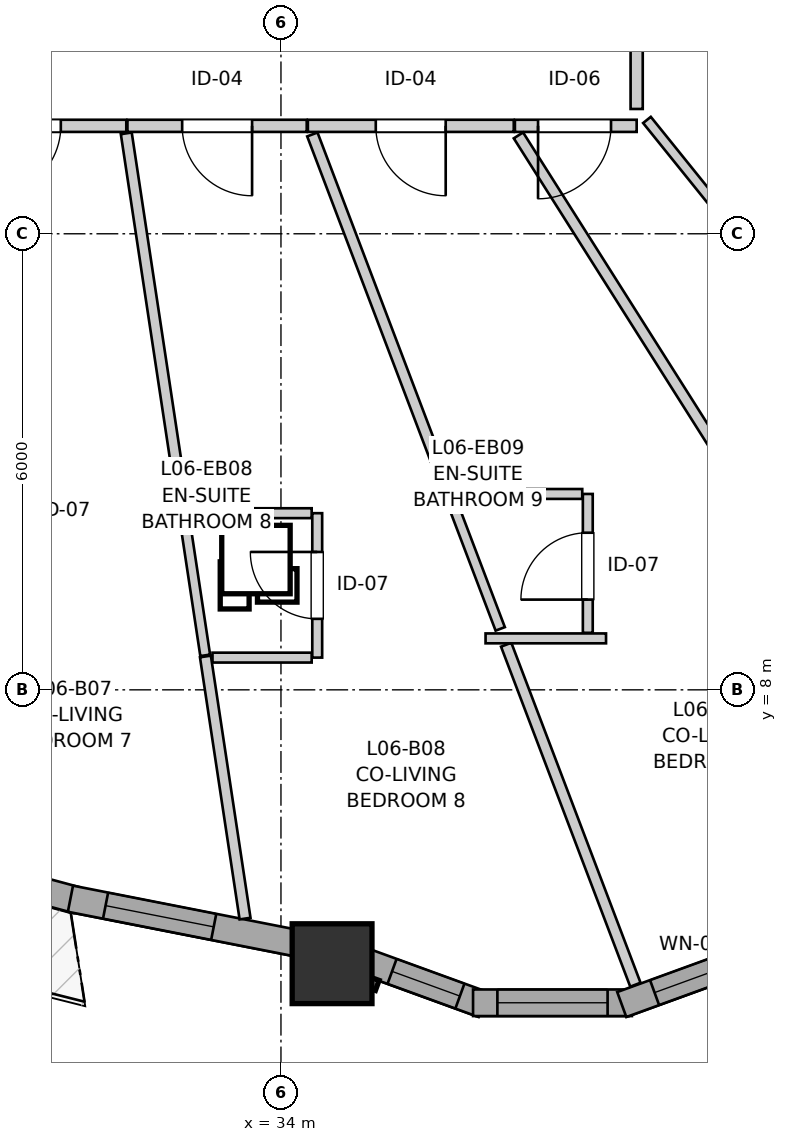
"""IFC4 building model, lengths in metres.
Left out: names, types, materials, properties, quantities, classifications, styles, units other than length and angle.
Written with IfcOpenShell. Run it as: python <this file> out.ifc"""

import sys

from ifc_helpers import new_model, si_unit, direction, frame, frame_2d, origin, origin_2d, place, context, subcontext, project, spatial, rectangle, extrude, source, transform, mapped, element, fill, save


model = new_model("IFC4")
c1 = context("Model", 3, precision=1e-05, world=origin(), true_north=direction((0.0, 1.0)))
c2 = subcontext(c1, "Body", "Model", "MODEL_VIEW")
j1 = project(units=[si_unit("LENGTHUNIT", "METRE"), si_unit("PLANEANGLEUNIT", "RADIAN")], contexts=[c1])
p1 = place(None, origin())
s1 = spatial("IfcSite", under=j1, at=p1, CompositionType="ELEMENT")
p2 = place(p1, origin())
s2 = spatial("IfcBuilding", under=s1, at=p2, CompositionType="ELEMENT")
p3 = place(p2, frame((0.0, 0.0, 23.8)))
s3 = spatial("IfcBuildingStorey", under=s2, at=p3, CompositionType="ELEMENT", Elevation=23.8)
m1 = source(origin(), c2, "Body", "SweptSolid", [
    extrude(rectangle(XDim=1.05, YDim=1.05, at=origin_2d()), origin(), (0.0, 0.0, 1.0), 2.935),
])
p4 = place(p3, frame((34.673, 4.397, 0.0), z_axis=(0.0, 0.0, 1.0), x_axis=(1.0, 0.0, 0.0)))
e1 = element("IfcColumn", 1, at=p4, inside=s3, PredefinedType="COLUMN", context=c2, shape_type="MappedRepresentation", body=[
    mapped(m1, transform((0.0, 0.0, 0.0), x_axis=(1.0, 0.0, 0.0), y_axis=(0.0, 1.0, 0.0), z_axis=(0.0, 0.0, 1.0), scale=1.0)),
])
p5 = place(p3, frame((27.986, 6.131, 0.0), z_axis=(0.0, 0.0, 1.0), x_axis=(0.96546113776, -0.2605471003, 0.0)))
e2 = element("IfcWall", 2, at=p5, inside=s3, PredefinedType="SOLIDWALL", context=c2, shape_type="SweptSolid", body=[
    extrude(rectangle(XDim=3.449, YDim=0.35, at=frame_2d((1.725, 0.0))), origin(), (0.0, 0.0, 1.0), 2.415),
])
p6 = place(p5, frame((1.179, 0.0, 0.82)))
e3 = element("IfcOpeningElement", 3, at=p6, cuts=e2, PredefinedType="OPENING", context=c2, shape_type="SweptSolid", body=[
    extrude(rectangle(XDim=1.45, YDim=1.25, at=frame_2d((0.725, 0.625))), frame((0.0, 0.185, 0.0), z_axis=(0.0, -1.0, 0.0), x_axis=(1.0, 0.0, 0.0)), (0.0, 0.0, 1.0), 0.37),
])
p7 = place(p3, frame((31.23, 5.252, 0.0), z_axis=(0.0, 0.0, 1.0), x_axis=(0.981232542219, -0.192828156892, 0.0)))
e4 = element("IfcWall", 4, at=p7, inside=s3, PredefinedType="SOLIDWALL", context=c2, shape_type="SweptSolid", body=[
    extrude(rectangle(XDim=3.242, YDim=0.35, at=frame_2d((1.621, 0.0))), origin(), (0.0, 0.0, 1.0), 2.415),
])
p8 = place(p7, frame((0.471, 0.0, 0.82)))
e5 = element("IfcOpeningElement", 5, at=p8, cuts=e4, PredefinedType="OPENING", context=c2, shape_type="SweptSolid", body=[
    extrude(rectangle(XDim=1.45, YDim=1.25, at=frame_2d((0.725, 0.625))), frame((0.0, 0.185, 0.0), z_axis=(0.0, -1.0, 0.0), x_axis=(1.0, 0.0, 0.0)), (0.0, 0.0, 1.0), 0.37),
])
p9 = place(p3, frame((35.014, 4.459, 0.0), z_axis=(0.0, 0.0, 1.0), x_axis=(0.939720171257, -0.341944439541, 0.0)))
e6 = element("IfcWall", 6, at=p9, inside=s3, PredefinedType="SOLIDWALL", context=c2, shape_type="SweptSolid", body=[
    extrude(rectangle(XDim=1.752, YDim=0.35, at=frame_2d((0.876, 0.0))), origin(), (0.0, 0.0, 1.0), 2.415),
])
p10 = place(p9, frame((0.476, 0.0, 0.82)))
e7 = element("IfcOpeningElement", 7, at=p10, cuts=e6, PredefinedType="OPENING", context=c2, shape_type="SweptSolid", body=[
    extrude(rectangle(XDim=0.95, YDim=1.35, at=frame_2d((0.475, 0.675))), frame((0.0, 0.185, 0.0), z_axis=(0.0, -1.0, 0.0), x_axis=(1.0, 0.0, 0.0)), (0.0, 0.0, 1.0), 0.37),
])
p11 = place(p3, frame((36.527, 3.883, 0.0), z_axis=(0.0, 0.0, 1.0), x_axis=(1.0, 0.0, 0.0)))
e8 = element("IfcWall", 8, at=p11, inside=s3, PredefinedType="SOLIDWALL", context=c2, shape_type="SweptSolid", body=[
    extrude(rectangle(XDim=2.09, YDim=0.35, at=frame_2d((1.045, 0.0))), origin(), (0.0, 0.0, 1.0), 2.415),
])
p12 = place(p11, frame((0.32, 0.0, 0.82)))
e9 = element("IfcOpeningElement", 9, at=p12, cuts=e8, PredefinedType="OPENING", context=c2, shape_type="SweptSolid", body=[
    extrude(rectangle(XDim=1.45, YDim=1.25, at=frame_2d((0.725, 0.625))), frame((0.0, 0.185, 0.0), z_axis=(0.0, -1.0, 0.0), x_axis=(1.0, 0.0, 0.0)), (0.0, 0.0, 1.0), 0.37),
])
p13 = place(p3, frame((38.484, 3.86, 0.0), z_axis=(0.0, 0.0, 1.0), x_axis=(0.939711556618, 0.341968113072, 0.0)))
e10 = element("IfcWall", 10, at=p13, inside=s3, PredefinedType="SOLIDWALL", context=c2, shape_type="SweptSolid", body=[
    extrude(rectangle(XDim=2.09, YDim=0.35, at=frame_2d((1.045, 0.0))), origin(), (0.0, 0.0, 1.0), 2.415),
])
p14 = place(p13, frame((0.459, 0.0, 0.82)))
e11 = element("IfcOpeningElement", 11, at=p14, cuts=e10, PredefinedType="OPENING", context=c2, shape_type="SweptSolid", body=[
    extrude(rectangle(XDim=1.35, YDim=1.45, at=frame_2d((0.675, 0.725))), frame((0.0, 0.185, 0.0), z_axis=(0.0, -1.0, 0.0), x_axis=(1.0, 0.0, 0.0)), (0.0, 0.0, 1.0), 0.37),
])
p15 = place(p3, frame((37.063, 15.42, 0.0), z_axis=(0.0, 0.0, 1.0), x_axis=(-1.0, 0.0, 0.0)))
e12 = element("IfcWall", 12, at=p15, inside=s3, PredefinedType="PARTITIONING", context=c2, shape_type="SweptSolid", body=[
    extrude(rectangle(XDim=2.709, YDim=0.16, at=frame_2d((1.354, 0.0))), origin(), (0.0, 0.0, 1.0), 2.935),
])
p16 = place(p15, frame((0.896, 0.0, 0.0)))
e13 = element("IfcOpeningElement", 13, at=p16, cuts=e12, PredefinedType="OPENING", context=c2, shape_type="SweptSolid", body=[
    extrude(rectangle(XDim=0.92, YDim=2.1, at=frame_2d((0.46, 1.05))), frame((0.0, 0.09, 0.0), z_axis=(0.0, -1.0, 0.0), x_axis=(1.0, 0.0, 0.0)), (0.0, 0.0, 1.0), 0.18),
])
p17 = place(p3, frame((31.965, 15.42, 0.0), z_axis=(0.0, 0.0, 1.0), x_axis=(-1.0, 0.0, 0.0)))
e14 = element("IfcWall", 14, at=p17, inside=s3, PredefinedType="PARTITIONING", context=c2, shape_type="SweptSolid", body=[
    extrude(rectangle(XDim=2.598, YDim=0.16, at=frame_2d((1.299, 0.0))), origin(), (0.0, 0.0, 1.0), 2.935),
])
p18 = place(p17, frame((0.862, 0.0, 0.0)))
e15 = element("IfcOpeningElement", 15, at=p18, cuts=e14, PredefinedType="OPENING", context=c2, shape_type="SweptSolid", body=[
    extrude(rectangle(XDim=0.92, YDim=2.1, at=frame_2d((0.46, 1.05))), frame((0.0, 0.09, 0.0), z_axis=(0.0, -1.0, 0.0), x_axis=(1.0, 0.0, 0.0)), (0.0, 0.0, 1.0), 0.18),
])
p19 = place(p3, frame((38.68, 18.147, 0.0), z_axis=(0.0, 0.0, 1.0), x_axis=(0.0, -1.0, 0.0)))
e16 = element("IfcWall", 16, at=p19, inside=s3, PredefinedType="PARTITIONING", context=c2, shape_type="SweptSolid", body=[
    extrude(rectangle(XDim=2.505, YDim=0.16, at=frame_2d((1.252, 0.0))), origin(), (0.0, 0.0, 1.0), 2.935),
])
p20 = place(p19, frame((0.748, 0.0, 0.0)))
e17 = element("IfcOpeningElement", 17, at=p20, cuts=e16, PredefinedType="OPENING", context=c2, shape_type="SweptSolid", body=[
    extrude(rectangle(XDim=0.95, YDim=2.1, at=frame_2d((0.475, 1.05))), frame((0.0, 0.09, 0.0), z_axis=(0.0, -1.0, 0.0), x_axis=(1.0, 0.0, 0.0)), (0.0, 0.0, 1.0), 0.18),
])
p21 = place(p3, frame((34.339, 15.42, 0.0), z_axis=(0.0, 0.0, 1.0), x_axis=(-1.0, 0.0, 0.0)))
e18 = element("IfcWall", 18, at=p21, inside=s3, PredefinedType="PARTITIONING", context=c2, shape_type="SweptSolid", body=[
    extrude(rectangle(XDim=2.359, YDim=0.16, at=frame_2d((1.18, 0.0))), origin(), (0.0, 0.0, 1.0), 2.935),
])
p22 = place(p21, frame((0.719, 0.0, 0.0)))
e19 = element("IfcOpeningElement", 19, at=p22, cuts=e18, PredefinedType="OPENING", context=c2, shape_type="SweptSolid", body=[
    extrude(rectangle(XDim=0.92, YDim=2.1, at=frame_2d((0.46, 1.05))), frame((0.0, 0.09, 0.0), z_axis=(0.0, -1.0, 0.0), x_axis=(1.0, 0.0, 0.0)), (0.0, 0.0, 1.0), 0.18),
])
p23 = place(p3, frame((34.477, 8.424, 0.0), z_axis=(0.0, 0.0, 1.0), x_axis=(0.0, 1.0, 0.0)))
e20 = element("IfcWall", 20, at=p23, inside=s3, PredefinedType="PARTITIONING", context=c2, shape_type="SweptSolid", body=[
    extrude(rectangle(XDim=1.9, YDim=0.13, at=frame_2d((0.95, 0.0))), origin(), (0.0, 0.0, 1.0), 2.935),
])
p24 = place(p23, frame((0.51, 0.0, 0.0)))
e21 = element("IfcOpeningElement", 21, at=p24, cuts=e20, PredefinedType="OPENING", context=c2, shape_type="SweptSolid", body=[
    extrude(rectangle(XDim=0.88, YDim=2.05, at=frame_2d((0.44, 1.025))), frame((0.0, 0.075, 0.0), z_axis=(0.0, -1.0, 0.0), x_axis=(1.0, 0.0, 0.0)), (0.0, 0.0, 1.0), 0.15),
])
p25 = place(p3, frame((38.037, 8.75, 0.0), z_axis=(0.0, 0.0, 1.0), x_axis=(0.0, 1.0, 0.0)))
e22 = element("IfcWall", 22, at=p25, inside=s3, PredefinedType="PARTITIONING", context=c2, shape_type="SweptSolid", body=[
    extrude(rectangle(XDim=1.827, YDim=0.13, at=frame_2d((0.914, 0.0))), origin(), (0.0, 0.0, 1.0), 2.935),
])
p26 = place(p25, frame((0.437, 0.0, 0.0)))
e23 = element("IfcOpeningElement", 23, at=p26, cuts=e22, PredefinedType="OPENING", context=c2, shape_type="SweptSolid", body=[
    extrude(rectangle(XDim=0.88, YDim=2.05, at=frame_2d((0.44, 1.025))), frame((0.0, 0.075, 0.0), z_axis=(0.0, -1.0, 0.0), x_axis=(1.0, 0.0, 0.0)), (0.0, 0.0, 1.0), 0.15),
])
p27 = place(p3, frame((38.68, 15.42, 0.0), z_axis=(0.0, 0.0, 1.0), x_axis=(-1.0, 0.0, 0.0)))
e24 = element("IfcWall", 24, at=p27, inside=s3, PredefinedType="PARTITIONING", context=c2, shape_type="SweptSolid", body=[
    extrude(rectangle(XDim=1.602, YDim=0.16, at=frame_2d((0.801, 0.0))), origin(), (0.0, 0.0, 1.0), 2.935),
])
p28 = place(p27, frame((0.337, 0.0, 0.0)))
e25 = element("IfcOpeningElement", 25, at=p28, cuts=e24, PredefinedType="OPENING", context=c2, shape_type="SweptSolid", body=[
    extrude(rectangle(XDim=0.96, YDim=2.1, at=frame_2d((0.48, 1.05))), frame((0.0, 0.09, 0.0), z_axis=(0.0, -1.0, 0.0), x_axis=(1.0, 0.0, 0.0)), (0.0, 0.0, 1.0), 0.18),
])
p29 = place(p3, frame((37.125, 15.294, 0.0), z_axis=(0.0, 0.0, 1.0), x_axis=(0.534743765269, -0.845014263492, 0.0)))
e26 = element("IfcWall", 26, at=p29, inside=s3, PredefinedType="PARTITIONING", context=c2, shape_type="SweptSolid", body=[
    extrude(rectangle(XDim=9.797, YDim=0.145, at=frame_2d((4.899, 0.0))), origin(), (0.0, 0.0, 1.0), 2.935),
])
p30 = place(p3, frame((38.81, 18.061, 0.0), z_axis=(0.0, 0.0, 1.0), x_axis=(0.729196389153, -0.684304483433, 0.0)))
e27 = element("IfcWall", 27, at=p30, inside=s3, PredefinedType="PARTITIONING", context=c2, shape_type="SweptSolid", body=[
    extrude(rectangle(XDim=7.396, YDim=0.13, at=frame_2d((3.698, 0.0))), origin(), (0.0, 0.0, 1.0), 2.935),
])
p31 = place(p3, frame((38.816, 15.498, 0.0), z_axis=(0.0, 0.0, 1.0), x_axis=(0.627528755525, -0.778593386171, 0.0)))
e28 = element("IfcWall", 28, at=p31, inside=s3, PredefinedType="PARTITIONING", context=c2, shape_type="SweptSolid", body=[
    extrude(rectangle(XDim=6.998, YDim=0.13, at=frame_2d((3.499, 0.0))), origin(), (0.0, 0.0, 1.0), 2.935),
])
p32 = place(p3, frame((34.413, 15.307, 0.0), z_axis=(0.0, 0.0, 1.0), x_axis=(0.355171610573, -0.934801116304, 0.0)))
e29 = element("IfcWall", 29, at=p32, inside=s3, PredefinedType="PARTITIONING", context=c2, shape_type="SweptSolid", body=[
    extrude(rectangle(XDim=5.177, YDim=0.145, at=frame_2d((2.589, 0.0))), origin(), (0.0, 0.0, 1.0), 2.935),
])
p33 = place(p3, frame((31.965, 15.321, 0.0), z_axis=(0.0, 0.0, 1.0), x_axis=(0.149541437001, -0.988755459464, 0.0)))
e30 = element("IfcWall", 30, at=p33, inside=s3, PredefinedType="PARTITIONING", context=c2, shape_type="SweptSolid", body=[
    extrude(rectangle(XDim=5.069, YDim=0.145, at=frame_2d((2.535, 0.0))), origin(), (0.0, 0.0, 1.0), 2.935),
])
p34 = place(p3, frame((36.963, 8.594, 0.0), z_axis=(0.0, 0.0, 1.0), x_axis=(0.35524629266, -0.934772737916, 0.0)))
e31 = element("IfcWall", 31, at=p34, inside=s3, PredefinedType="PARTITIONING", context=c2, shape_type="SweptSolid", body=[
    extrude(rectangle(XDim=4.785, YDim=0.145, at=frame_2d((2.393, 0.0))), origin(), (0.0, 0.0, 1.0), 2.935),
])
p35 = place(p3, frame((33.006, 8.439, 0.0), z_axis=(0.0, 0.0, 1.0), x_axis=(0.149510938207, -0.988760071684, 0.0)))
e32 = element("IfcWall", 32, at=p35, inside=s3, PredefinedType="PARTITIONING", context=c2, shape_type="SweptSolid", body=[
    extrude(rectangle(XDim=3.488, YDim=0.145, at=frame_2d((1.744, 0.0))), origin(), (0.0, 0.0, 1.0), 2.935),
])
p36 = place(p3, frame((36.257, 10.453, 0.0), z_axis=(0.0, 0.0, 1.0), x_axis=(0.355345777079, -0.934734924303, 0.0)))
e33 = element("IfcWall", 33, at=p36, inside=s3, PredefinedType="PARTITIONING", context=c2, shape_type="SweptSolid", body=[
    extrude(rectangle(XDim=1.766, YDim=0.13, at=frame_2d((0.883, 0.0))), origin(), (0.0, 0.0, 1.0), 2.935),
])
p37 = place(p3, frame((32.725, 10.294, 0.0), z_axis=(0.0, 0.0, 1.0), x_axis=(0.149533379282, -0.988756678096, 0.0)))
e34 = element("IfcWall", 34, at=p37, inside=s3, PredefinedType="PARTITIONING", context=c2, shape_type="SweptSolid", body=[
    extrude(rectangle(XDim=1.861, YDim=0.13, at=frame_2d((0.931, 0.0))), origin(), (0.0, 0.0, 1.0), 2.935),
])
p38 = place(p3, frame((36.347, 10.577, 0.0), z_axis=(0.0, 0.0, 1.0), x_axis=(1.0, 0.0, 0.0)))
e35 = element("IfcWall", 35, at=p38, inside=s3, PredefinedType="PARTITIONING", context=c2, shape_type="SweptSolid", body=[
    extrude(rectangle(XDim=1.617, YDim=0.13, at=frame_2d((0.808, 0.0))), origin(), (0.0, 0.0, 1.0), 2.935),
])
p39 = place(p3, frame((32.812, 10.324, 0.0), z_axis=(0.0, 0.0, 1.0), x_axis=(1.0, 0.0, 0.0)))
e36 = element("IfcWall", 36, at=p39, inside=s3, PredefinedType="PARTITIONING", context=c2, shape_type="SweptSolid", body=[
    extrude(rectangle(XDim=1.592, YDim=0.13, at=frame_2d((0.796, 0.0))), origin(), (0.0, 0.0, 1.0), 2.935),
])
p40 = place(p3, frame((33.099, 8.424, 0.0), z_axis=(0.0, 0.0, 1.0), x_axis=(1.0, 0.0, 0.0)))
e37 = element("IfcWall", 37, at=p40, inside=s3, PredefinedType="PARTITIONING", context=c2, shape_type="SweptSolid", body=[
    extrude(rectangle(XDim=1.305, YDim=0.13, at=frame_2d((0.652, 0.0))), origin(), (0.0, 0.0, 1.0), 2.503),
])
p41 = place(p3, frame((36.692, 8.677, 0.0), z_axis=(0.0, 0.0, 1.0), x_axis=(1.0, 0.0, 0.0)))
e38 = element("IfcWall", 38, at=p41, inside=s3, PredefinedType="PARTITIONING", context=c2, shape_type="SweptSolid", body=[
    extrude(rectangle(XDim=1.585, YDim=0.13, at=frame_2d((0.792, 0.0))), origin(), (0.0, 0.0, 1.0), 2.935),
])
m2 = source(origin(), c2, "Body", "SweptSolid", [
    extrude(rectangle(XDim=1.45, YDim=1.25, at=frame_2d((0.725, 0.625))), frame((0.0, 0.03, 0.0), z_axis=(0.0, -1.0, 0.0), x_axis=(1.0, 0.0, 0.0)), (0.0, 0.0, 1.0), 0.06),
])
p42 = place(p8, origin())
e39 = element("IfcWindow", 39, at=p42, inside=s3, PartitioningType="SINGLE_PANEL", PredefinedType="WINDOW", context=c2, shape_type="MappedRepresentation", body=[
    mapped(m2, transform((0.0, 0.0, 0.0), x_axis=(1.0, 0.0, 0.0), y_axis=(0.0, 1.0, 0.0), z_axis=(0.0, 0.0, 1.0), scale=1.0)),
])
fill(e5, e39)
m3 = source(origin(), c2, "Body", "SweptSolid", [
    extrude(rectangle(XDim=0.95, YDim=1.35, at=frame_2d((0.475, 0.675))), frame((0.0, 0.03, 0.0), z_axis=(0.0, -1.0, 0.0), x_axis=(1.0, 0.0, 0.0)), (0.0, 0.0, 1.0), 0.06),
])
p43 = place(p10, origin())
e40 = element("IfcWindow", 40, at=p43, inside=s3, PartitioningType="SINGLE_PANEL", PredefinedType="WINDOW", context=c2, shape_type="MappedRepresentation", body=[
    mapped(m3, transform((0.0, 0.0, 0.0), x_axis=(1.0, 0.0, 0.0), y_axis=(0.0, 1.0, 0.0), z_axis=(0.0, 0.0, 1.0), scale=1.0)),
])
fill(e7, e40)
p44 = place(p12, origin())
e41 = element("IfcWindow", 41, at=p44, inside=s3, PartitioningType="SINGLE_PANEL", PredefinedType="WINDOW", context=c2, shape_type="MappedRepresentation", body=[
    mapped(m2, transform((0.0, 0.0, 0.0), x_axis=(1.0, 0.0, 0.0), y_axis=(0.0, 1.0, 0.0), z_axis=(0.0, 0.0, 1.0), scale=1.0)),
])
fill(e9, e41)
m4 = source(origin(), c2, "Body", "SweptSolid", [
    extrude(rectangle(XDim=1.35, YDim=1.45, at=frame_2d((0.675, 0.725))), frame((0.0, 0.03, 0.0), z_axis=(0.0, -1.0, 0.0), x_axis=(1.0, 0.0, 0.0)), (0.0, 0.0, 1.0), 0.06),
])
p45 = place(p14, origin())
e42 = element("IfcWindow", 42, at=p45, inside=s3, PartitioningType="SINGLE_PANEL", PredefinedType="WINDOW", context=c2, shape_type="MappedRepresentation", body=[
    mapped(m4, transform((0.0, 0.0, 0.0), x_axis=(1.0, 0.0, 0.0), y_axis=(0.0, 1.0, 0.0), z_axis=(0.0, 0.0, 1.0), scale=1.0)),
])
fill(e11, e42)
m5 = source(origin(), c2, "Body", "SweptSolid", [
    extrude(rectangle(XDim=0.92, YDim=2.1, at=frame_2d((0.46, 1.05))), frame((0.0, 0.025, 0.0), z_axis=(0.0, -1.0, 0.0), x_axis=(1.0, 0.0, 0.0)), (0.0, 0.0, 1.0), 0.05),
])
p46 = place(p16, origin())
e43 = element("IfcDoor", 43, at=p46, inside=s3, OperationType="SINGLE_SWING_LEFT", PredefinedType="DOOR", context=c2, shape_type="MappedRepresentation", body=[
    mapped(m5, transform((0.0, 0.0, 0.0), x_axis=(1.0, 0.0, 0.0), y_axis=(0.0, 1.0, 0.0), z_axis=(0.0, 0.0, 1.0), scale=1.0)),
])
fill(e13, e43)
p47 = place(p18, origin())
e44 = element("IfcDoor", 44, at=p47, inside=s3, OperationType="SINGLE_SWING_RIGHT", PredefinedType="DOOR", context=c2, shape_type="MappedRepresentation", body=[
    mapped(m5, transform((0.0, 0.0, 0.0), x_axis=(1.0, 0.0, 0.0), y_axis=(0.0, 1.0, 0.0), z_axis=(0.0, 0.0, 1.0), scale=1.0)),
])
fill(e15, e44)
p48 = place(p22, origin())
e45 = element("IfcDoor", 45, at=p48, inside=s3, OperationType="SINGLE_SWING_LEFT", PredefinedType="DOOR", context=c2, shape_type="MappedRepresentation", body=[
    mapped(m5, transform((0.0, 0.0, 0.0), x_axis=(1.0, 0.0, 0.0), y_axis=(0.0, 1.0, 0.0), z_axis=(0.0, 0.0, 1.0), scale=1.0)),
])
fill(e19, e45)
m6 = source(origin(), c2, "Body", "SweptSolid", [
    extrude(rectangle(XDim=0.88, YDim=2.05, at=frame_2d((0.44, 1.025))), frame((0.0, 0.025, 0.0), z_axis=(0.0, -1.0, 0.0), x_axis=(1.0, 0.0, 0.0)), (0.0, 0.0, 1.0), 0.05),
])
p49 = place(p24, origin())
e46 = element("IfcDoor", 46, at=p49, inside=s3, OperationType="SINGLE_SWING_RIGHT", PredefinedType="DOOR", context=c2, shape_type="MappedRepresentation", body=[
    mapped(m6, transform((0.0, 0.0, 0.0), x_axis=(1.0, 0.0, 0.0), y_axis=(0.0, 1.0, 0.0), z_axis=(0.0, 0.0, 1.0), scale=1.0)),
])
fill(e21, e46)
p50 = place(p26, origin())
e47 = element("IfcDoor", 47, at=p50, inside=s3, OperationType="SINGLE_SWING_LEFT", PredefinedType="DOOR", context=c2, shape_type="MappedRepresentation", body=[
    mapped(m6, transform((0.0, 0.0, 0.0), x_axis=(1.0, 0.0, 0.0), y_axis=(0.0, 1.0, 0.0), z_axis=(0.0, 0.0, 1.0), scale=1.0)),
])
fill(e23, e47)
m7 = source(origin(), c2, "Body", "SweptSolid", [
    extrude(rectangle(XDim=0.96, YDim=2.1, at=frame_2d((0.48, 1.05))), frame((0.0, 0.025, 0.0), z_axis=(0.0, -1.0, 0.0), x_axis=(1.0, 0.0, 0.0)), (0.0, 0.0, 1.0), 0.05),
])
p51 = place(p28, origin())
e48 = element("IfcDoor", 48, at=p51, inside=s3, OperationType="SINGLE_SWING_RIGHT", PredefinedType="DOOR", context=c2, shape_type="MappedRepresentation", body=[
    mapped(m7, transform((0.0, 0.0, 0.0), x_axis=(1.0, 0.0, 0.0), y_axis=(0.0, 1.0, 0.0), z_axis=(0.0, 0.0, 1.0), scale=1.0)),
])
fill(e25, e48)
save(model, sys.argv[1])
